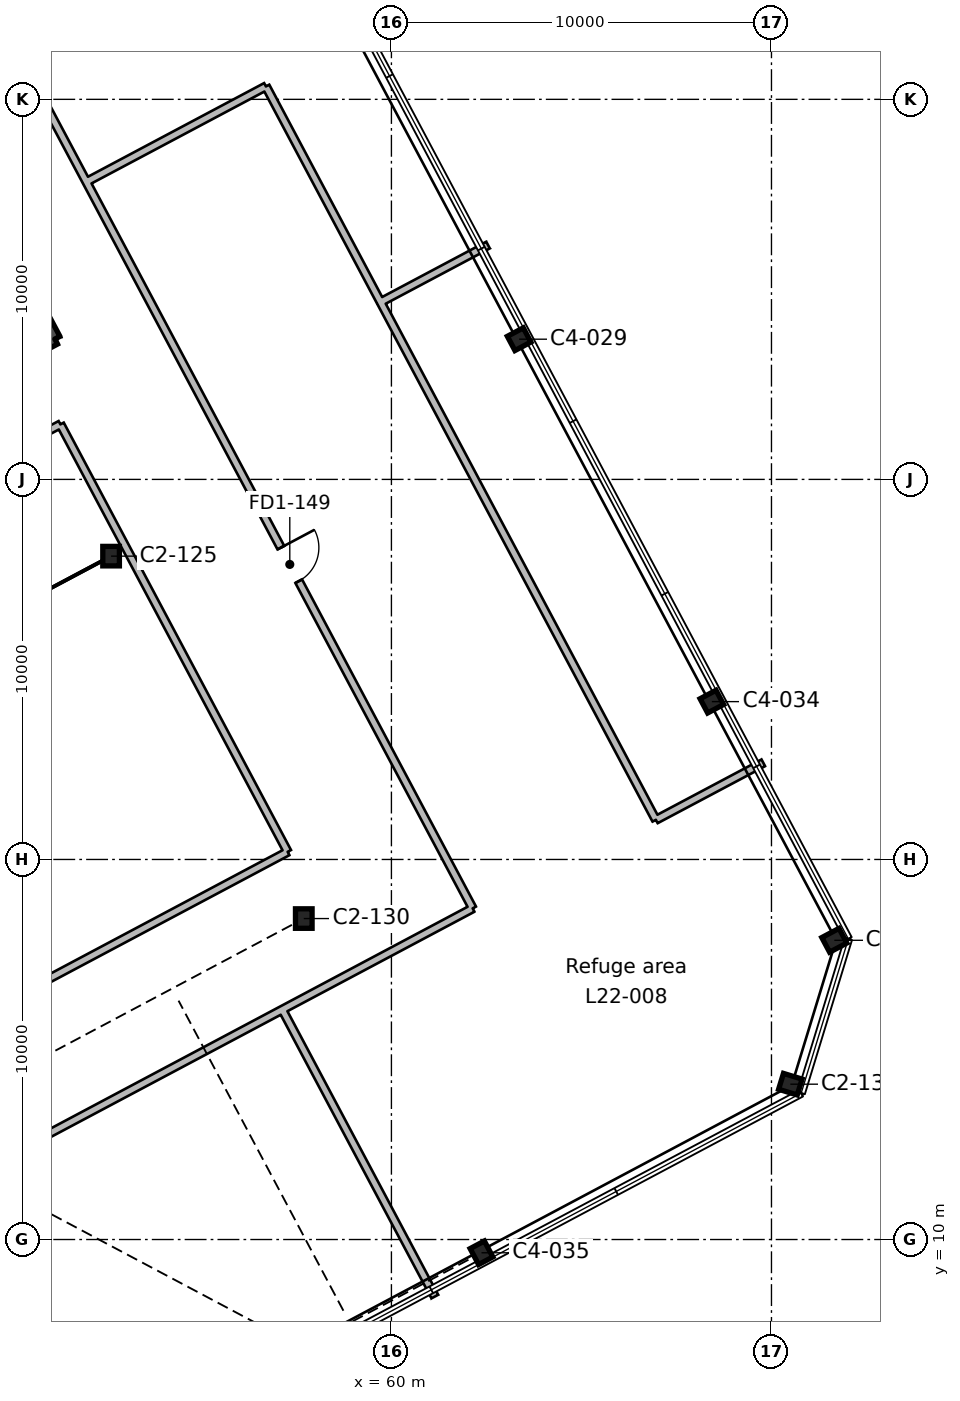
"""IFC4 building model, lengths in metres.
Left out: names, types, materials, properties, quantities, classifications, styles, units other than length and angle.
Written with IfcOpenShell. Run it as: python <this file> out.ifc"""

import sys

from ifc_helpers import new_model, si_unit, direction, frame, frame_2d, origin, origin_2d, place, context, subcontext, project, spatial, rectangle, i_section, extrude, element, fill, save


model = new_model("IFC4")
c1 = context("Model", 3, precision=1e-05, world=origin(), true_north=direction((0.0, 1.0)))
c2 = subcontext(c1, "Body", "Model", "MODEL_VIEW")
j1 = project(units=[si_unit("LENGTHUNIT", "METRE"), si_unit("PLANEANGLEUNIT", "RADIAN")], contexts=[c1])
p1 = place(None, origin())
s1 = spatial("IfcSite", under=j1, at=p1, CompositionType="ELEMENT")
p2 = place(p1, origin())
s2 = spatial("IfcBuilding", under=s1, at=p2, CompositionType="ELEMENT")
p3 = place(p2, frame((0.0, 0.0, 112.2)))
s3 = spatial("IfcBuildingStorey", under=s2, at=p3, CompositionType="ELEMENT", Elevation=112.2)
p4 = place(p3, frame((62.37, 9.651, 0.0), z_axis=(0.0, 0.0, 1.0), x_axis=(0.882947592859, 0.469471562786, 0.0)))
e1 = element("IfcColumn", 1, at=p4, inside=s3, PredefinedType="COLUMN", context=c2, shape_type="SweptSolid", body=[
    extrude(i_section(OverallWidth=0.424, OverallDepth=0.475, WebThickness=0.048, FlangeThickness=0.077, FilletRadius=0.015, at=origin_2d()), origin(), (0.0, 0.0, 1.0), 6.0),
])
for number, where, z_axis, x_axis in (
    (2, (70.497, 14.087, 0.0), (0.0, 0.0, 1.0), (0.292, 0.956, 0.0)),
    (3, (71.654, 17.873, 0.0), (0.0, 0.0, 1.0), (-0.469, 0.883, 0.0)),
    (4, (57.694, 18.445, 0.0), (0.0, 0.0, 1.0), (1.0, 0.0, 0.0)),
):
    element("IfcColumn", number, at=place(p3, frame(where, z_axis=z_axis, x_axis=x_axis)), inside=s3, PredefinedType="COLUMN", context=c2, shape_type="SweptSolid", body=[
        extrude(i_section(OverallWidth=0.437, OverallDepth=0.513, WebThickness=0.061, FlangeThickness=0.097, FilletRadius=0.015, at=origin_2d()), origin(), (0.0, 0.0, 1.0), 6.0),
    ])
p5 = place(p3, frame((68.431, 24.153, 0.0), z_axis=(0.0, 0.0, 1.0), x_axis=(-0.469471562786, 0.882947592859, 0.0)))
e5 = element("IfcColumn", 5, at=p5, inside=s3, PredefinedType="COLUMN", context=c2, shape_type="SweptSolid", body=[
    extrude(i_section(OverallWidth=0.424, OverallDepth=0.475, WebThickness=0.048, FlangeThickness=0.077, FilletRadius=0.015, at=origin_2d()), origin(), (0.0, 0.0, 1.0), 6.0),
])
p6 = place(p3, frame((52.624, 27.981, 0.0), z_axis=(0.0, 0.0, 1.0), x_axis=(1.0, 0.0, 0.0)))
e6 = element("IfcColumn", 6, at=p6, inside=s3, PredefinedType="COLUMN", context=c2, shape_type="SweptSolid", body=[
    extrude(i_section(OverallWidth=0.437, OverallDepth=0.513, WebThickness=0.061, FlangeThickness=0.097, FilletRadius=0.015, at=origin_2d()), origin(), (0.0, 0.0, 1.0), 6.0),
])
p7 = place(p3, frame((63.36, 33.689, 0.0), z_axis=(0.0, 0.0, 1.0), x_axis=(-0.469471562786, 0.882947592859, 0.0)))
e7 = element("IfcColumn", 7, at=p7, inside=s3, PredefinedType="COLUMN", context=c2, shape_type="SweptSolid", body=[
    extrude(i_section(OverallWidth=0.424, OverallDepth=0.475, WebThickness=0.048, FlangeThickness=0.077, FilletRadius=0.015, at=origin_2d()), origin(), (0.0, 0.0, 1.0), 6.0),
])
p8 = place(p3, frame((49.384, 37.004, 0.0), z_axis=(0.0, 0.0, 1.0), x_axis=(0.46946936446, -0.882948761726, 0.0)))
e8 = element("IfcWall", 8, at=p8, inside=s3, PredefinedType="SHEAR", context=c2, shape_type="SweptSolid", body=[
    extrude(rectangle(XDim=3.75, YDim=0.3, at=frame_2d((1.875, 0.0))), origin(), (0.0, 0.0, 1.0), 6.0),
])
p9 = place(p3, frame((51.145, 33.693, 0.0), z_axis=(0.0, 0.0, 1.0), x_axis=(-0.882945809314, -0.469474917132, 0.0)))
e9 = element("IfcWall", 9, at=p9, inside=s3, PredefinedType="SHEAR", context=c2, shape_type="SweptSolid", body=[
    extrude(rectangle(XDim=8.3, YDim=0.3, at=frame_2d((4.15, 0.0))), origin(), (0.0, 0.0, 1.0), 6.0),
])
p10 = place(p9, frame((6.725, 0.0, 0.0)))
e10 = element("IfcOpeningElement", 10, at=p10, cuts=e9, PredefinedType="OPENING", context=c2, shape_type="SweptSolid", body=[
    extrude(rectangle(XDim=1.2, YDim=2.1, at=frame_2d((0.6, 1.05))), frame((0.0, 0.16, 0.0), z_axis=(0.0, -1.0, 0.0), x_axis=(1.0, 0.0, 0.0)), (0.0, 0.0, 1.0), 0.32),
])
p11 = place(p3, frame((57.135, 16.052, 0.0), z_axis=(0.0, 0.0, 1.0), x_axis=(-0.882947211229, -0.469472280528, 0.0)))
e11 = element("IfcWall", 11, at=p11, inside=s3, PredefinedType="PARTITIONING", context=c2, shape_type="SweptSolid", body=[
    extrude(rectangle(XDim=60.236, YDim=0.2, at=frame_2d((30.118, 0.0))), origin(), (0.0, 0.0, 1.0), 5.55),
])
p12 = place(p11, frame((38.75, 0.0, 0.0)))
e12 = element("IfcOpeningElement", 12, at=p12, cuts=e11, PredefinedType="OPENING", context=c2, shape_type="SweptSolid", body=[
    extrude(rectangle(XDim=1.0, YDim=2.1, at=frame_2d((0.5, 1.05))), frame((0.0, 0.11, 0.0), z_axis=(0.0, -1.0, 0.0), x_axis=(1.0, 0.0, 0.0)), (0.0, 0.0, 1.0), 0.22),
])
p13 = place(p11, frame((29.65, 0.0, 0.0)))
e13 = element("IfcOpeningElement", 13, at=p13, cuts=e11, PredefinedType="OPENING", context=c2, shape_type="SweptSolid", body=[
    extrude(rectangle(XDim=1.0, YDim=2.1, at=frame_2d((0.5, 1.05))), frame((0.0, 0.11, 0.0), z_axis=(0.0, -1.0, 0.0), x_axis=(1.0, 0.0, 0.0)), (0.0, 0.0, 1.0), 0.22),
])
p14 = place(p11, frame((20.85, 0.0, 0.0)))
e14 = element("IfcOpeningElement", 14, at=p14, cuts=e11, PredefinedType="OPENING", context=c2, shape_type="SweptSolid", body=[
    extrude(rectangle(XDim=1.0, YDim=2.1, at=frame_2d((0.5, 1.05))), frame((0.0, 0.11, 0.0), z_axis=(0.0, -1.0, 0.0), x_axis=(1.0, 0.0, 0.0)), (0.0, 0.0, 1.0), 0.22),
])
p15 = place(p3, frame((51.971, 37.835, 0.0), z_axis=(0.0, 0.0, 1.0), x_axis=(-0.469669656808, 0.882842235892, 0.0)))
e15 = element("IfcWall", 15, at=p15, inside=s3, PredefinedType="PARTITIONING", context=c2, shape_type="SweptSolid", body=[
    extrude(rectangle(XDim=3.643, YDim=0.2, at=frame_2d((1.821, 0.0))), origin(), (0.0, 0.0, 1.0), 5.55),
])
p16 = place(p3, frame((38.028, 40.607, 0.0), z_axis=(0.0, 0.0, 1.0), x_axis=(0.882955326711, 0.469457017237, 0.0)))
e16 = element("IfcWall", 16, at=p16, inside=s3, PredefinedType="PARTITIONING", context=c2, shape_type="SweptSolid", body=[
    extrude(rectangle(XDim=19.576, YDim=0.2, at=frame_2d((9.788, 0.0))), origin(), (0.0, 0.0, 1.0), 5.55),
])
p17 = place(p3, frame((57.128, 16.049, 0.0), z_axis=(0.0, 0.0, 1.0), x_axis=(0.469446762432, -0.882960778994, 0.0)))
e17 = element("IfcWall", 17, at=p17, inside=s3, PredefinedType="PARTITIONING", context=c2, shape_type="SweptSolid", body=[
    extrude(rectangle(XDim=8.551, YDim=0.2, at=frame_2d((4.275, 0.0))), origin(), (0.0, 0.0, 1.0), 5.55),
])
p18 = place(p3, frame((46.434, 28.866, 0.0), z_axis=(0.0, 0.0, 1.0), x_axis=(0.882942083458, 0.469481924316, 0.0)))
e18 = element("IfcWall", 18, at=p18, inside=s3, PredefinedType="PARTITIONING", context=c2, shape_type="SweptSolid", body=[
    extrude(rectangle(XDim=5.5, YDim=0.2, at=frame_2d((2.75, 0.0))), origin(), (0.0, 0.0, 1.0), 5.55),
])
p19 = place(p3, frame((51.29, 31.448, 0.0), z_axis=(0.0, 0.0, 1.0), x_axis=(0.469459757109, -0.882953869947, 0.0)))
e19 = element("IfcWall", 19, at=p19, inside=s3, PredefinedType="PARTITIONING", context=c2, shape_type="SweptSolid", body=[
    extrude(rectangle(XDim=12.738, YDim=0.2, at=frame_2d((6.369, 0.0))), origin(), (0.0, 0.0, 1.0), 5.55),
])
p20 = place(p3, frame((57.27, 20.201, 0.0), z_axis=(0.0, 0.0, 1.0), x_axis=(-0.882965394181, -0.469438081837, 0.0)))
e20 = element("IfcWall", 20, at=p20, inside=s3, PredefinedType="PARTITIONING", context=c2, shape_type="SweptSolid", body=[
    extrude(rectangle(XDim=9.886, YDim=0.2, at=frame_2d((4.943, 0.0))), origin(), (0.0, 0.0, 1.0), 5.55),
])
p21 = place(p3, frame((51.971, 37.835, 0.0), z_axis=(0.0, 0.0, 1.0), x_axis=(0.469310046076, -0.883033453869, 0.0)))
e21 = element("IfcWall", 21, at=p21, inside=s3, PredefinedType="PARTITIONING", context=c2, shape_type="SweptSolid", body=[
    extrude(rectangle(XDim=1.23, YDim=0.2, at=frame_2d((0.615, 0.0))), origin(), (0.0, 0.0, 1.0), 5.55),
])
p22 = place(p3, frame((52.022, 37.854, 0.0), z_axis=(0.0, 0.0, 1.0), x_axis=(0.882963467498, 0.469441705714, 0.0)))
e22 = element("IfcWall", 22, at=p22, inside=s3, PredefinedType="PARTITIONING", context=c2, shape_type="SweptSolid", body=[
    extrude(rectangle(XDim=5.296, YDim=0.2, at=frame_2d((2.648, 0.0))), origin(), (0.0, 0.0, 1.0), 5.55),
])
p23 = place(p3, frame((56.698, 40.34, 0.0), z_axis=(0.0, 0.0, 1.0), x_axis=(0.4693776796, -0.882997505032, 0.0)))
e23 = element("IfcWall", 23, at=p23, inside=s3, PredefinedType="PARTITIONING", context=c2, shape_type="SweptSolid", body=[
    extrude(rectangle(XDim=6.419, YDim=0.2, at=frame_2d((3.209, 0.0))), origin(), (0.0, 0.0, 1.0), 5.55),
])
p24 = place(p3, frame((57.135, 16.052, 0.0), z_axis=(0.0, 0.0, 1.0), x_axis=(0.882890251807, 0.469579389735, 0.0)))
e24 = element("IfcWall", 24, at=p24, inside=s3, PredefinedType="PARTITIONING", context=c2, shape_type="SweptSolid", body=[
    extrude(rectangle(XDim=5.667, YDim=0.2, at=frame_2d((2.833, 0.0))), origin(), (0.0, 0.0, 1.0), 5.55),
])
p25 = place(p3, frame((62.138, 18.713, 0.0), z_axis=(0.0, 0.0, 1.0), x_axis=(-0.469466289279, 0.882950396812, 0.0)))
e25 = element("IfcWall", 25, at=p25, inside=s3, PredefinedType="PARTITIONING", context=c2, shape_type="SweptSolid", body=[
    extrude(rectangle(XDim=20.427, YDim=0.2, at=frame_2d((10.213, 0.0))), origin(), (0.0, 0.0, 1.0), 5.55),
])
p26 = place(p25, frame((9.75, 0.0, 0.0)))
e26 = element("IfcOpeningElement", 26, at=p26, cuts=e25, PredefinedType="OPENING", context=c2, shape_type="SweptSolid", body=[
    extrude(rectangle(XDim=1.0, YDim=2.1, at=frame_2d((0.5, 1.05))), frame((0.0, 0.11, 0.0), z_axis=(0.0, -1.0, 0.0), x_axis=(1.0, 0.0, 0.0)), (0.0, 0.0, 1.0), 0.22),
])
p27 = place(p3, frame((59.711, 34.672, 0.0), z_axis=(0.0, 0.0, 1.0), x_axis=(0.469461626855, -0.882952875815, 0.0)))
e27 = element("IfcWall", 27, at=p27, inside=s3, PredefinedType="PARTITIONING", context=c2, shape_type="SweptSolid", body=[
    extrude(rectangle(XDim=15.437, YDim=0.2, at=frame_2d((7.719, 0.0))), origin(), (0.0, 0.0, 1.0), 5.55),
])
p28 = place(p3, frame((66.958, 21.042, 0.0), z_axis=(0.0, 0.0, 1.0), x_axis=(0.883221370652, 0.468956299056, 0.0)))
e28 = element("IfcWall", 28, at=p28, inside=s3, PredefinedType="PARTITIONING", context=c2, shape_type="SweptSolid", body=[
    extrude(rectangle(XDim=3.201, YDim=0.2, at=frame_2d((1.6, 0.0))), origin(), (0.0, 0.0, 1.0), 5.55),
])
p29 = place(p3, frame((62.542, 36.166, 0.0), z_axis=(0.0, 0.0, 1.0), x_axis=(-0.883094981885, -0.46919425931, 0.0)))
e29 = element("IfcWall", 29, at=p29, inside=s3, PredefinedType="PARTITIONING", context=c2, shape_type="SweptSolid", body=[
    extrude(rectangle(XDim=3.201, YDim=0.2, at=frame_2d((1.601, 0.0))), origin(), (0.0, 0.0, 1.0), 5.55),
])
p30 = place(p26, frame((1.0, 0.0, 0.0), z_axis=(0.0, 0.0, 1.0), x_axis=(-1.0, 0.0, 0.0)))
e30 = element("IfcDoor", 30, at=p30, inside=s3, OperationType="SINGLE_SWING_LEFT", PredefinedType="DOOR", context=c2, shape_type="SweptSolid", body=[
    extrude(rectangle(XDim=1.0, YDim=2.1, at=frame_2d((0.5, 1.05))), frame((0.0, 0.025, 0.0), z_axis=(0.0, -1.0, 0.0), x_axis=(1.0, 0.0, 0.0)), (0.0, 0.0, 1.0), 0.05),
])
fill(e26, e30)
save(model, sys.argv[1])
